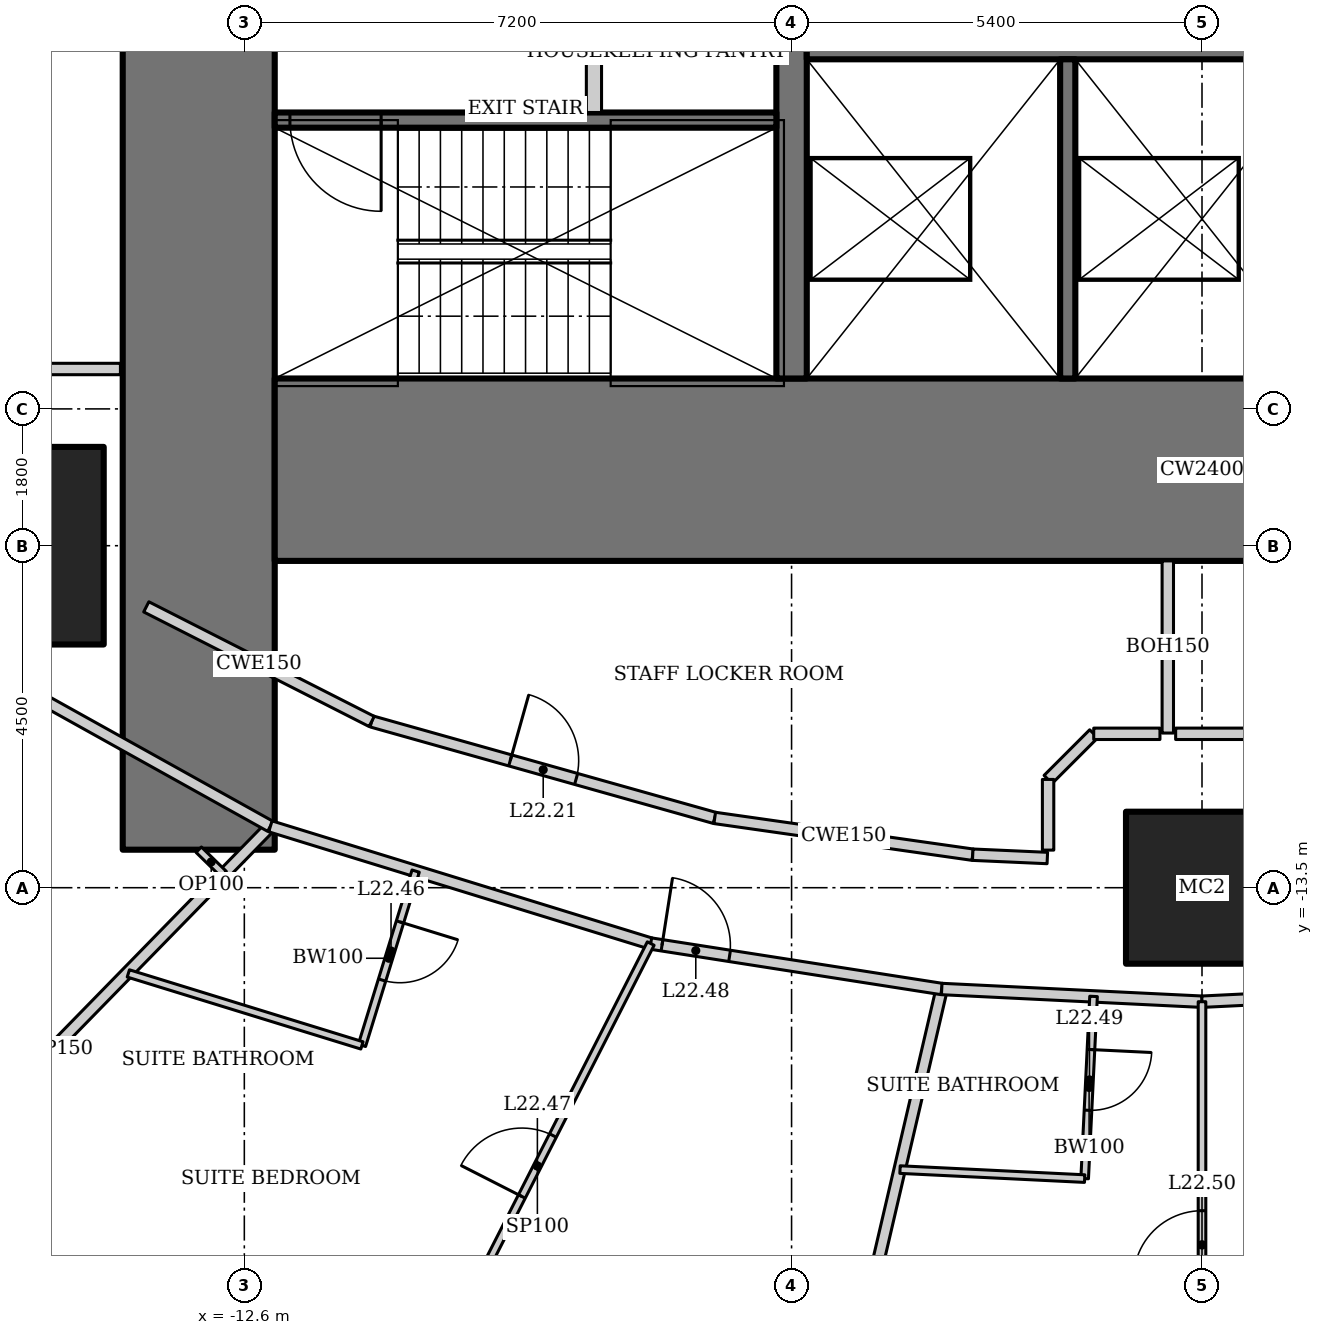
"""IFC4 building model, lengths in metres.
Left out: names, types, materials, properties, quantities, classifications, styles, units other than length and angle.
Written with IfcOpenShell. Run it as: python <this file> out.ifc"""

import sys

from ifc_helpers import new_model, si_unit, direction, frame, frame_2d, origin, origin_2d, place, context, subcontext, project, spatial, rectangle, hollow_rectangle, extrude, element, fill, save


model = new_model("IFC4")
c1 = context("Model", 3, precision=1e-05, world=origin(), true_north=direction((0.0, 1.0)))
c2 = subcontext(c1, "Body", "Model", "MODEL_VIEW")
j1 = project(units=[si_unit("LENGTHUNIT", "METRE"), si_unit("PLANEANGLEUNIT", "RADIAN")], contexts=[c1])
p1 = place(None, origin())
s1 = spatial("IfcSite", under=j1, at=p1, CompositionType="ELEMENT")
p2 = place(p1, origin())
s2 = spatial("IfcBuilding", under=s1, at=p2, CompositionType="ELEMENT")
p3 = place(p2, frame((0.0, 0.0, 94.6)))
s3 = spatial("IfcBuildingStorey", under=s2, at=p3, CompositionType="ELEMENT", Elevation=94.6)
p4 = place(p3, frame((-15.75, -9.0, 0.0), z_axis=(0.0, 0.0, 1.0), x_axis=(1.0, 0.0, 0.0)))
e1 = element("IfcColumn", 1, at=p4, inside=s3, PredefinedType="COLUMN", context=c2, shape_type="SweptSolid", body=[
    extrude(hollow_rectangle(XDim=2.6, YDim=2.6, WallThickness=0.13, at=origin_2d()), origin(), (0.0, 0.0, 1.0), 3.6),
])
p5 = place(p3, frame((0.0, -13.5, 0.0), z_axis=(0.0, 0.0, 1.0), x_axis=(1.0, 0.0, 0.0)))
e2 = element("IfcColumn", 2, at=p5, inside=s3, PredefinedType="COLUMN", context=c2, shape_type="SweptSolid", body=[
    extrude(hollow_rectangle(XDim=2.0, YDim=2.0, WallThickness=0.17, at=origin_2d()), origin(), (0.0, 0.0, 1.0), 3.6),
])
p6 = place(p3, frame((-13.2, 13.0, 0.0), z_axis=(0.0, 0.0, 1.0), x_axis=(0.0, -1.0, 0.0)))
e3 = element("IfcWall", 3, at=p6, inside=s3, PredefinedType="SHEAR", context=c2, shape_type="SweptSolid", body=[
    extrude(rectangle(XDim=26.0, YDim=2.0, at=frame_2d((13.0, 0.0))), origin(), (0.0, 0.0, 1.0), 3.6),
])
p7 = place(p6, frame((12.1, 0.0, 0.0)))
e4 = element("IfcOpeningElement", 4, at=p7, cuts=e3, PredefinedType="OPENING", context=c2, shape_type="SweptSolid", body=[
    extrude(rectangle(XDim=1.8, YDim=2.1, at=frame_2d((0.9, 1.05))), frame((0.0, 1.01, 0.0), z_axis=(0.0, -1.0, 0.0), x_axis=(1.0, 0.0, 0.0)), (0.0, 0.0, 1.0), 2.02),
])
p8 = place(p3, frame((-12.2, -8.0, 0.0), z_axis=(0.0, 0.0, 1.0), x_axis=(1.0, 0.0, 0.0)))
e5 = element("IfcWall", 5, at=p8, inside=s3, PredefinedType="SHEAR", context=c2, shape_type="SweptSolid", body=[
    extrude(rectangle(XDim=24.4, YDim=2.4, at=frame_2d((12.2, 0.0))), origin(), (0.0, 0.0, 1.0), 3.6),
])
p9 = place(p3, frame((-5.4, 6.8, 0.0), z_axis=(0.0, 0.0, 1.0), x_axis=(0.0, -1.0, 0.0)))
e6 = element("IfcWall", 6, at=p9, inside=s3, PredefinedType="SHEAR", context=c2, shape_type="SweptSolid", body=[
    extrude(rectangle(XDim=13.6, YDim=0.4, at=frame_2d((6.8, 0.0))), origin(), (0.0, 0.0, 1.0), 3.6),
])
p10 = place(p9, frame((5.9, 0.0, 0.0)))
e7 = element("IfcOpeningElement", 7, at=p10, cuts=e6, PredefinedType="OPENING", context=c2, shape_type="SweptSolid", body=[
    extrude(rectangle(XDim=1.8, YDim=2.1, at=frame_2d((0.9, 1.05))), frame((0.0, 0.21, 0.0), z_axis=(0.0, -1.0, 0.0), x_axis=(1.0, 0.0, 0.0)), (0.0, 0.0, 1.0), 0.42),
])
p11 = place(p3, frame((-5.2, -2.4, 0.0), z_axis=(0.0, 0.0, 1.0), x_axis=(1.0, 0.0, 0.0)))
e8 = element("IfcWall", 8, at=p11, inside=s3, PredefinedType="SHEAR", context=c2, shape_type="SweptSolid", body=[
    extrude(rectangle(XDim=10.4, YDim=0.4, at=frame_2d((5.2, 0.0))), origin(), (0.0, 0.0, 1.0), 3.6),
])
p12 = place(p11, frame((0.55, 0.0, 0.0)))
e9 = element("IfcOpeningElement", 9, at=p12, cuts=e8, PredefinedType="OPENING", context=c2, shape_type="SweptSolid", body=[
    extrude(rectangle(XDim=1.1, YDim=2.2, at=frame_2d((0.55, 1.1))), frame((0.0, 0.21, 0.0), z_axis=(0.0, -1.0, 0.0), x_axis=(1.0, 0.0, 0.0)), (0.0, 0.0, 1.0), 0.42),
])
p13 = place(p11, frame((4.083, 0.0, 0.0)))
e10 = element("IfcOpeningElement", 10, at=p13, cuts=e8, PredefinedType="OPENING", context=c2, shape_type="SweptSolid", body=[
    extrude(rectangle(XDim=1.1, YDim=2.2, at=frame_2d((0.55, 1.1))), frame((0.0, 0.21, 0.0), z_axis=(0.0, -1.0, 0.0), x_axis=(1.0, 0.0, 0.0)), (0.0, 0.0, 1.0), 0.42),
])
p14 = place(p11, frame((7.617, 0.0, 0.0)))
e11 = element("IfcOpeningElement", 11, at=p14, cuts=e8, PredefinedType="OPENING", context=c2, shape_type="SweptSolid", body=[
    extrude(rectangle(XDim=1.1, YDim=2.2, at=frame_2d((0.55, 1.1))), frame((0.0, 0.21, 0.0), z_axis=(0.0, -1.0, 0.0), x_axis=(1.0, 0.0, 0.0)), (0.0, 0.0, 1.0), 0.42),
])
p15 = place(p3, frame((-1.767, -2.6, 0.0), z_axis=(0.0, 0.0, 1.0), x_axis=(0.0, -1.0, 0.0)))
e12 = element("IfcWall", 12, at=p15, inside=s3, PredefinedType="SOLIDWALL", context=c2, shape_type="SweptSolid", body=[
    extrude(rectangle(XDim=4.2, YDim=0.2, at=frame_2d((2.1, 0.0))), origin(), (0.0, 0.0, 1.0), 3.6),
])
p16 = place(p3, frame((-5.6, -3.4, 0.0), z_axis=(0.0, 0.0, 1.0), x_axis=(-1.0, 0.0, 0.0)))
e13 = element("IfcWall", 13, at=p16, inside=s3, PredefinedType="SHEAR", context=c2, shape_type="SweptSolid", body=[
    extrude(rectangle(XDim=6.6, YDim=0.2, at=frame_2d((3.3, 0.0))), origin(), (0.0, 0.0, 1.0), 3.6),
])
p17 = place(p16, frame((5.2, 0.0, 0.0)))
e14 = element("IfcOpeningElement", 14, at=p17, cuts=e13, PredefinedType="OPENING", context=c2, shape_type="SweptSolid", body=[
    extrude(rectangle(XDim=1.2, YDim=2.1, at=frame_2d((0.6, 1.05))), frame((0.0, 0.11, 0.0), z_axis=(0.0, -1.0, 0.0), x_axis=(1.0, 0.0, 0.0)), (0.0, 0.0, 1.0), 0.22),
])
p18 = place(p3, frame((-8.0, -1.1, 0.0), z_axis=(0.0, 0.0, 1.0), x_axis=(0.0, -1.0, 0.0)))
e15 = element("IfcWall", 15, at=p18, inside=s3, PredefinedType="SOLIDWALL", context=c2, shape_type="SweptSolid", body=[
    extrude(rectangle(XDim=2.2, YDim=0.2, at=frame_2d((1.1, 0.0))), origin(), (0.0, 0.0, 1.0), 3.45),
])
p19 = place(p3, frame((-17.97, -18.542, 0.0), z_axis=(0.0, 0.0, 1.0), x_axis=(0.698757291878, 0.715358823981, 0.0)))
e16 = element("IfcWall", 16, at=p19, inside=s3, PredefinedType="PARTITIONING", context=c2, shape_type="SweptSolid", body=[
    extrude(rectangle(XDim=8.177, YDim=0.15, at=frame_2d((4.088, 0.0))), origin(), (0.0, 0.0, 1.0), 2.528),
])
p20 = place(p3, frame((-5.211, -22.496, 0.0), z_axis=(0.0, 0.0, 1.0), x_axis=(0.227056984461, 0.973881474209, 0.0)))
e17 = element("IfcWall", 17, at=p20, inside=s3, PredefinedType="PARTITIONING", context=c2, shape_type="SweptSolid", body=[
    extrude(rectangle(XDim=7.869, YDim=0.15, at=frame_2d((3.934, 0.0))), origin(), (0.0, 0.0, 1.0), 2.767),
])
p21 = place(p3, frame((-17.299, -9.885, 0.0), z_axis=(0.0, 0.0, 1.0), x_axis=(0.873695910579, -0.486472461541, 0.0)))
e18 = element("IfcWall", 18, at=p21, inside=s3, PredefinedType="PARTITIONING", context=c2, shape_type="SweptSolid", body=[
    extrude(rectangle(XDim=5.771, YDim=0.15, at=frame_2d((2.885, 0.0))), origin(), (0.0, 0.0, 1.0), 3.45),
])
p22 = place(p3, frame((-12.257, -12.693, 0.0), z_axis=(0.0, 0.0, 1.0), x_axis=(0.955657956744, -0.294478980085, 0.0)))
e19 = element("IfcWall", 19, at=p22, inside=s3, PredefinedType="PARTITIONING", context=c2, shape_type="SweptSolid", body=[
    extrude(rectangle(XDim=5.236, YDim=0.15, at=frame_2d((2.618, 0.0))), origin(), (0.0, 0.0, 1.0), 3.45),
])
p23 = place(p3, frame((-7.253, -14.235, 0.0), z_axis=(0.0, 0.0, 1.0), x_axis=(0.988015036573, -0.154357660987, 0.0)))
e20 = element("IfcWall", 20, at=p23, inside=s3, PredefinedType="PARTITIONING", context=c2, shape_type="SweptSolid", body=[
    extrude(rectangle(XDim=3.875, YDim=0.15, at=frame_2d((1.938, 0.0))), origin(), (0.0, 0.0, 1.0), 3.45),
])
p24 = place(p23, frame((0.15, 0.0, 0.0)))
e21 = element("IfcOpeningElement", 21, at=p24, cuts=e20, PredefinedType="OPENING", context=c2, shape_type="SweptSolid", body=[
    extrude(rectangle(XDim=0.9, YDim=2.1, at=frame_2d((0.45, 1.05))), frame((0.0, 0.085, 0.0), z_axis=(0.0, -1.0, 0.0), x_axis=(1.0, 0.0, 0.0)), (0.0, 0.0, 1.0), 0.17),
])
p25 = place(p3, frame((-3.424, -14.833, 0.0), z_axis=(0.0, 0.0, 1.0), x_axis=(0.998809560203, -0.048779733975, 0.0)))
e22 = element("IfcWall", 22, at=p25, inside=s3, PredefinedType="PARTITIONING", context=c2, shape_type="SweptSolid", body=[
    extrude(rectangle(XDim=3.428, YDim=0.15, at=frame_2d((1.714, 0.0))), origin(), (0.0, 0.0, 1.0), 3.45),
])
p26 = place(p3, frame((0.0, -15.0, 0.0), z_axis=(0.0, 0.0, 1.0), x_axis=(0.998809560203, 0.048779733975, 0.0)))
e23 = element("IfcWall", 23, at=p26, inside=s3, PredefinedType="PARTITIONING", context=c2, shape_type="SweptSolid", body=[
    extrude(rectangle(XDim=3.428, YDim=0.15, at=frame_2d((1.714, 0.0))), origin(), (0.0, 0.0, 1.0), 3.45),
])
p27 = place(p26, frame((2.378, 0.0, 0.0)))
e24 = element("IfcOpeningElement", 24, at=p27, cuts=e23, PredefinedType="OPENING", context=c2, shape_type="SweptSolid", body=[
    extrude(rectangle(XDim=0.9, YDim=2.1, at=frame_2d((0.45, 1.05))), frame((0.0, 0.085, 0.0), z_axis=(0.0, -1.0, 0.0), x_axis=(1.0, 0.0, 0.0)), (0.0, 0.0, 1.0), 0.17),
])
p28 = place(p3, frame((-10.924, -11.312, 0.0), z_axis=(0.0, 0.0, 1.0), x_axis=(0.962643729928, -0.270771211967, 0.0)))
e25 = element("IfcWall", 25, at=p28, inside=s3, PredefinedType="PARTITIONING", context=c2, shape_type="SweptSolid", body=[
    extrude(rectangle(XDim=4.688, YDim=0.15, at=frame_2d((2.344, 0.0))), origin(), (0.0, 0.0, 1.0), 3.45),
])
p29 = place(p28, frame((1.894, 0.0, 0.0)))
e26 = element("IfcOpeningElement", 26, at=p29, cuts=e25, PredefinedType="OPENING", context=c2, shape_type="SweptSolid", body=[
    extrude(rectangle(XDim=0.9, YDim=2.1, at=frame_2d((0.45, 1.05))), frame((0.0, 0.085, 0.0), z_axis=(0.0, -1.0, 0.0), x_axis=(1.0, 0.0, 0.0)), (0.0, 0.0, 1.0), 0.17),
])
p30 = place(p3, frame((-6.411, -12.582, 0.0), z_axis=(0.0, 0.0, 1.0), x_axis=(0.990002114939, -0.14105251652, 0.0)))
e27 = element("IfcWall", 27, at=p30, inside=s3, PredefinedType="PARTITIONING", context=c2, shape_type="SweptSolid", body=[
    extrude(rectangle(XDim=3.429, YDim=0.15, at=frame_2d((1.714, 0.0))), origin(), (0.0, 0.0, 1.0), 3.45),
])
p31 = place(p3, frame((-10.346, -13.281, 0.0), z_axis=(0.0, 0.0, 1.0), x_axis=(-0.294478957423, -0.955657963727, 0.0)))
e28 = element("IfcWall", 28, at=p31, inside=s3, PredefinedType="PARTITIONING", context=c2, shape_type="SweptSolid", body=[
    extrude(rectangle(XDim=2.4, YDim=0.1, at=frame_2d((1.2, 0.0))), origin(), (0.0, 0.0, 1.0), 3.45),
])
p32 = place(p31, frame((0.7, 0.0, 0.0)))
e29 = element("IfcOpeningElement", 29, at=p32, cuts=e28, PredefinedType="OPENING", context=c2, shape_type="SweptSolid", body=[
    extrude(rectangle(XDim=0.8, YDim=2.1, at=frame_2d((0.4, 1.05))), frame((0.0, 0.06, 0.0), z_axis=(0.0, -1.0, 0.0), x_axis=(1.0, 0.0, 0.0)), (0.0, 0.0, 1.0), 0.12),
])
p33 = place(p3, frame((-11.052, -15.575, 0.0), z_axis=(0.0, 0.0, 1.0), x_axis=(-0.955641033268, 0.294533895391, 0.0)))
e30 = element("IfcWall", 30, at=p33, inside=s3, PredefinedType="PARTITIONING", context=c2, shape_type="SweptSolid", body=[
    extrude(rectangle(XDim=3.216, YDim=0.1, at=frame_2d((1.608, 0.0))), origin(), (0.0, 0.0, 1.0), 3.45),
])
p34 = place(p3, frame((-10.236, -20.088, 0.0), z_axis=(0.0, 0.0, 1.0), x_axis=(0.453993694696, 0.89100489627, 0.0)))
e31 = element("IfcWall", 31, at=p34, inside=s3, PredefinedType="PARTITIONING", context=c2, shape_type="SweptSolid", body=[
    extrude(rectangle(XDim=6.57, YDim=0.1, at=frame_2d((3.285, 0.0))), origin(), (0.0, 0.0, 1.0), 2.528),
])
p35 = place(p34, frame((2.835, 0.0, 0.0)))
e32 = element("IfcOpeningElement", 32, at=p35, cuts=e31, PredefinedType="OPENING", context=c2, shape_type="SweptSolid", body=[
    extrude(rectangle(XDim=0.9, YDim=2.1, at=frame_2d((0.45, 1.05))), frame((0.0, 0.06, 0.0), z_axis=(0.0, -1.0, 0.0), x_axis=(1.0, 0.0, 0.0)), (0.0, 0.0, 1.0), 0.12),
])
p36 = place(p3, frame((-1.427, -14.93, 0.0), z_axis=(0.0, 0.0, 1.0), x_axis=(-0.048831470304, -0.998807032168, 0.0)))
e33 = element("IfcWall", 33, at=p36, inside=s3, PredefinedType="PARTITIONING", context=c2, shape_type="SweptSolid", body=[
    extrude(rectangle(XDim=2.4, YDim=0.1, at=frame_2d((1.2, 0.0))), origin(), (0.0, 0.0, 1.0), 3.45),
])
p37 = place(p36, frame((0.7, 0.0, 0.0)))
e34 = element("IfcOpeningElement", 34, at=p37, cuts=e33, PredefinedType="OPENING", context=c2, shape_type="SweptSolid", body=[
    extrude(rectangle(XDim=0.8, YDim=2.1, at=frame_2d((0.4, 1.05))), frame((0.0, 0.06, 0.0), z_axis=(0.0, -1.0, 0.0), x_axis=(1.0, 0.0, 0.0)), (0.0, 0.0, 1.0), 0.12),
])
p38 = place(p3, frame((-1.544, -17.327, 0.0), z_axis=(0.0, 0.0, 1.0), x_axis=(-0.998813899717, 0.048690797202, 0.0)))
e35 = element("IfcWall", 35, at=p38, inside=s3, PredefinedType="PARTITIONING", context=c2, shape_type="SweptSolid", body=[
    extrude(rectangle(XDim=2.432, YDim=0.1, at=frame_2d((1.216, 0.0))), origin(), (0.0, 0.0, 1.0), 3.45),
])
p39 = place(p3, frame((0.0, -21.4, 0.0), z_axis=(0.0, 0.0, 1.0), x_axis=(0.0, 1.0, 0.0)))
e36 = element("IfcWall", 36, at=p39, inside=s3, PredefinedType="PARTITIONING", context=c2, shape_type="SweptSolid", body=[
    extrude(rectangle(XDim=6.4, YDim=0.1, at=frame_2d((3.2, 0.0))), origin(), (0.0, 0.0, 1.0), 2.924),
])
p40 = place(p39, frame((2.75, 0.0, 0.0)))
e37 = element("IfcOpeningElement", 37, at=p40, cuts=e36, PredefinedType="OPENING", context=c2, shape_type="SweptSolid", body=[
    extrude(rectangle(XDim=0.9, YDim=2.1, at=frame_2d((0.45, 1.05))), frame((0.0, 0.06, 0.0), z_axis=(0.0, -1.0, 0.0), x_axis=(1.0, 0.0, 0.0)), (0.0, 0.0, 1.0), 0.12),
])
p41 = place(p3, frame((-13.2, -13.0, 0.0), z_axis=(0.0, 0.0, 1.0), x_axis=(0.715289751842, -0.698827998087, 0.0)))
e38 = element("IfcWall", 38, at=p41, inside=s3, PredefinedType="PARTITIONING", context=c2, shape_type="SweptSolid", body=[
    extrude(rectangle(XDim=0.46, YDim=0.1, at=frame_2d((0.23, 0.0))), origin(), (0.0, 0.0, 1.0), 3.45),
])
p42 = place(p3, frame((-13.89, -9.805, 0.0), z_axis=(0.0, 0.0, 1.0), x_axis=(0.891398195277, -0.453220980821, 0.0)))
e39 = element("IfcWall", 39, at=p42, inside=s3, PredefinedType="PARTITIONING", context=c2, shape_type="SweptSolid", body=[
    extrude(rectangle(XDim=3.327, YDim=0.15, at=frame_2d((1.664, 0.0))), origin(), (0.0, 0.0, 1.0), 3.45),
])
p43 = place(p3, frame((-17.475, -6.675, 0.0), z_axis=(0.0, 0.0, 1.0), x_axis=(1.0, 0.0, 0.0)))
e40 = element("IfcWall", 40, at=p43, inside=s3, PredefinedType="PARTITIONING", context=c2, shape_type="SweptSolid", body=[
    extrude(rectangle(XDim=3.245, YDim=0.15, at=frame_2d((1.622, 0.0))), origin(), (0.0, 0.0, 1.0), 3.45),
])
p44 = place(p3, frame((-3.016, -13.066, 0.0), z_axis=(0.0, 0.0, 1.0), x_axis=(0.999010128674, -0.044483286824, 0.0)))
e41 = element("IfcWall", 41, at=p44, inside=s3, PredefinedType="PARTITIONING", context=c2, shape_type="SweptSolid", body=[
    extrude(rectangle(XDim=0.982, YDim=0.15, at=frame_2d((0.491, 0.0))), origin(), (0.0, 0.0, 1.0), 3.45),
])
p45 = place(p3, frame((-0.45, -9.2, 0.0), z_axis=(0.0, 0.0, 1.0), x_axis=(0.0, -1.0, 0.0)))
e42 = element("IfcWall", 42, at=p45, inside=s3, PredefinedType="PARTITIONING", context=c2, shape_type="SweptSolid", body=[
    extrude(rectangle(XDim=2.265, YDim=0.15, at=frame_2d((1.133, 0.0))), origin(), (0.0, 0.0, 1.0), 3.45),
])
p46 = place(p3, frame((-2.025, -12.075, 0.0), z_axis=(0.0, 0.0, 1.0), x_axis=(0.707106781187, 0.707106781187, 0.0)))
e43 = element("IfcWall", 43, at=p46, inside=s3, PredefinedType="PARTITIONING", context=c2, shape_type="SweptSolid", body=[
    extrude(rectangle(XDim=0.849, YDim=0.15, at=frame_2d((0.425, 0.0))), origin(), (0.0, 0.0, 1.0), 3.45),
])
p47 = place(p3, frame((-1.425, -11.475, 0.0), z_axis=(0.0, 0.0, 1.0), x_axis=(1.0, 0.0, 0.0)))
e44 = element("IfcWall", 44, at=p47, inside=s3, PredefinedType="PARTITIONING", context=c2, shape_type="SweptSolid", body=[
    extrude(rectangle(XDim=0.871, YDim=0.15, at=frame_2d((0.436, 0.0))), origin(), (0.0, 0.0, 1.0), 3.45),
])
p48 = place(p3, frame((-2.025, -13.005, 0.0), z_axis=(0.0, 0.0, 1.0), x_axis=(0.0, 1.0, 0.0)))
e45 = element("IfcWall", 45, at=p48, inside=s3, PredefinedType="PARTITIONING", context=c2, shape_type="SweptSolid", body=[
    extrude(rectangle(XDim=0.93, YDim=0.15, at=frame_2d((0.465, 0.0))), origin(), (0.0, 0.0, 1.0), 2.749),
])
p49 = place(p3, frame((-0.347, -11.475, 0.0), z_axis=(0.0, 0.0, 1.0), x_axis=(1.0, 0.0, 0.0)))
e46 = element("IfcWall", 46, at=p49, inside=s3, PredefinedType="PARTITIONING", context=c2, shape_type="SweptSolid", body=[
    extrude(rectangle(XDim=1.771, YDim=0.15, at=frame_2d((0.886, 0.0))), origin(), (0.0, 0.0, 1.0), 3.45),
])
p50 = place(p17, origin())
e47 = element("IfcDoor", 47, at=p50, inside=s3, OperationType="SINGLE_SWING_RIGHT", PredefinedType="DOOR", context=c2, shape_type="SweptSolid", body=[
    extrude(rectangle(XDim=1.2, YDim=2.1, at=frame_2d((0.6, 1.05))), frame((0.0, 0.025, 0.0), z_axis=(0.0, -1.0, 0.0), x_axis=(1.0, 0.0, 0.0)), (0.0, 0.0, 1.0), 0.05),
])
fill(e14, e47)
p51 = place(p29, origin())
e48 = element("IfcDoor", 48, at=p51, inside=s3, OperationType="SINGLE_SWING_LEFT", PredefinedType="DOOR", context=c2, shape_type="SweptSolid", body=[
    extrude(rectangle(XDim=0.9, YDim=2.1, at=frame_2d((0.45, 1.05))), frame((0.0, 0.025, 0.0), z_axis=(0.0, -1.0, 0.0), x_axis=(1.0, 0.0, 0.0)), (0.0, 0.0, 1.0), 0.05),
])
fill(e26, e48)
p52 = place(p32, origin())
e49 = element("IfcDoor", 49, at=p52, inside=s3, OperationType="SINGLE_SWING_LEFT", PredefinedType="DOOR", context=c2, shape_type="SweptSolid", body=[
    extrude(rectangle(XDim=0.8, YDim=2.1, at=frame_2d((0.4, 1.05))), frame((0.0, 0.025, 0.0), z_axis=(0.0, -1.0, 0.0), x_axis=(1.0, 0.0, 0.0)), (0.0, 0.0, 1.0), 0.05),
])
fill(e29, e49)
p53 = place(p35, origin())
e50 = element("IfcDoor", 50, at=p53, inside=s3, OperationType="SINGLE_SWING_LEFT", PredefinedType="DOOR", context=c2, shape_type="SweptSolid", body=[
    extrude(rectangle(XDim=0.9, YDim=2.1, at=frame_2d((0.45, 1.05))), frame((0.0, 0.025, 0.0), z_axis=(0.0, -1.0, 0.0), x_axis=(1.0, 0.0, 0.0)), (0.0, 0.0, 1.0), 0.05),
])
fill(e32, e50)
p54 = place(p24, origin())
e51 = element("IfcDoor", 51, at=p54, inside=s3, OperationType="SINGLE_SWING_LEFT", PredefinedType="DOOR", context=c2, shape_type="SweptSolid", body=[
    extrude(rectangle(XDim=0.9, YDim=2.1, at=frame_2d((0.45, 1.05))), frame((0.0, 0.025, 0.0), z_axis=(0.0, -1.0, 0.0), x_axis=(1.0, 0.0, 0.0)), (0.0, 0.0, 1.0), 0.05),
])
fill(e21, e51)
p55 = place(p37, origin())
e52 = element("IfcDoor", 52, at=p55, inside=s3, OperationType="SINGLE_SWING_LEFT", PredefinedType="DOOR", context=c2, shape_type="SweptSolid", body=[
    extrude(rectangle(XDim=0.8, YDim=2.1, at=frame_2d((0.4, 1.05))), frame((0.0, 0.025, 0.0), z_axis=(0.0, -1.0, 0.0), x_axis=(1.0, 0.0, 0.0)), (0.0, 0.0, 1.0), 0.05),
])
fill(e34, e52)
p56 = place(p40, origin())
e53 = element("IfcDoor", 53, at=p56, inside=s3, OperationType="SINGLE_SWING_LEFT", PredefinedType="DOOR", context=c2, shape_type="SweptSolid", body=[
    extrude(rectangle(XDim=0.9, YDim=2.1, at=frame_2d((0.45, 1.05))), frame((0.0, 0.025, 0.0), z_axis=(0.0, -1.0, 0.0), x_axis=(1.0, 0.0, 0.0)), (0.0, 0.0, 1.0), 0.05),
])
fill(e37, e53)
save(model, sys.argv[1])
